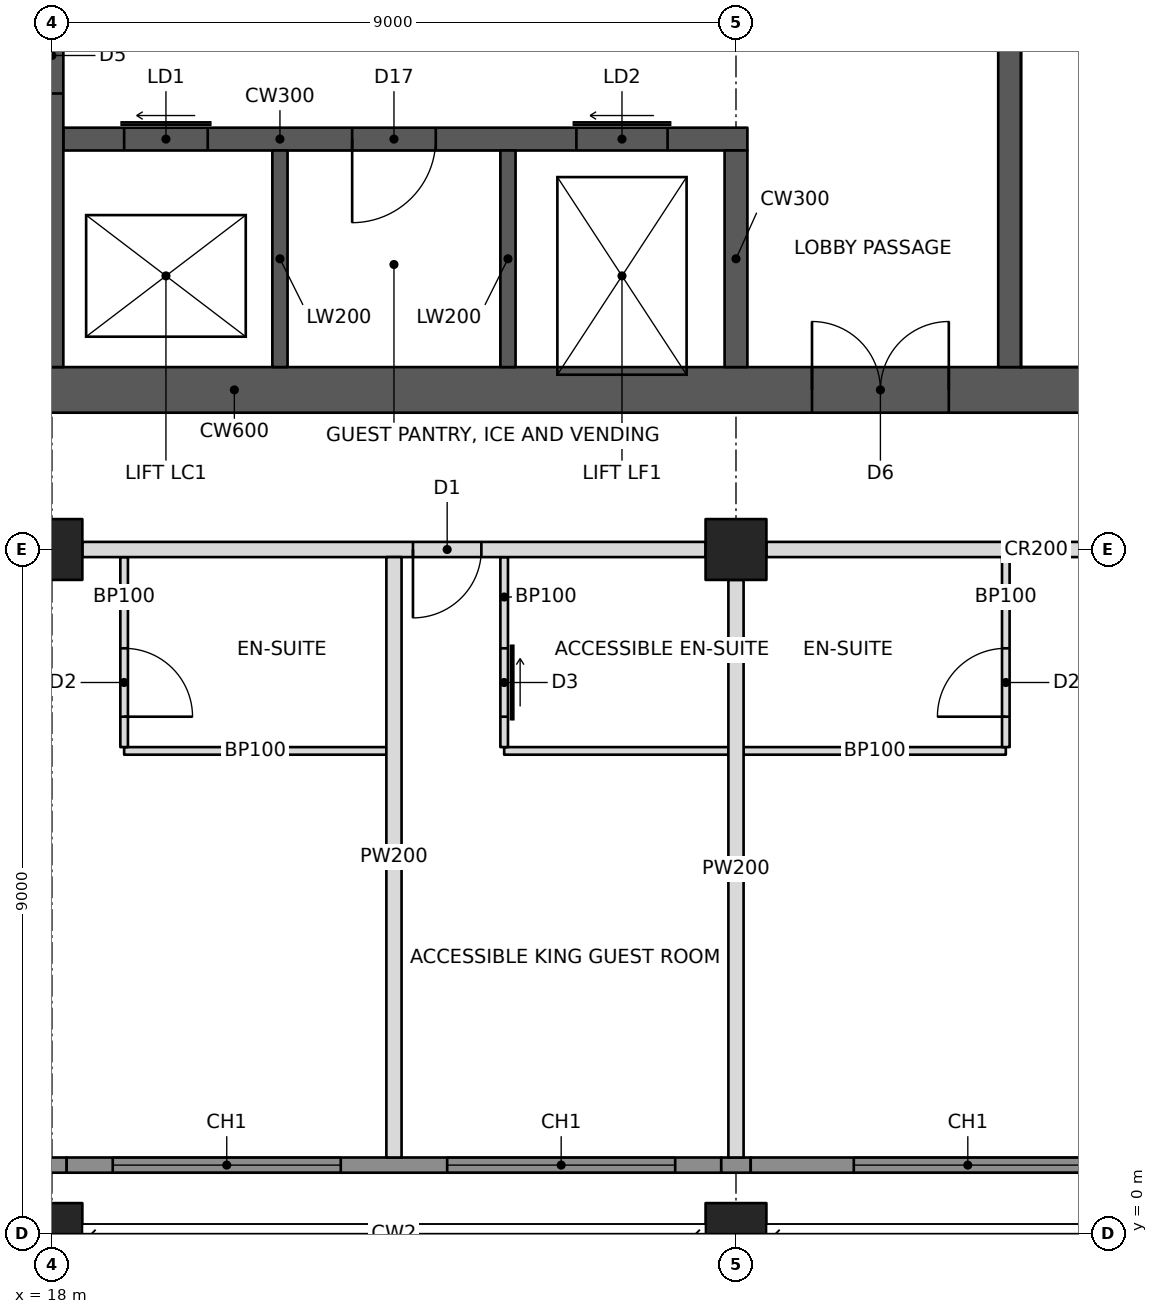
"""IFC4 building model, lengths in metres.
Left out: names, types, materials, properties, quantities, classifications, styles, units other than length and angle.
Written with IfcOpenShell. Run it as: python <this file> out.ifc"""

import sys

from ifc_helpers import new_model, si_unit, direction, frame, frame_2d, origin, origin_2d, place, context, subcontext, project, spatial, rectangle, hollow_rectangle, extrude, element, fill, save


model = new_model("IFC4")
c1 = context("Model", 3, precision=1e-05, world=origin(), true_north=direction((0.0, 1.0)))
c2 = subcontext(c1, "Body", "Model", "MODEL_VIEW")
j1 = project(units=[si_unit("LENGTHUNIT", "METRE"), si_unit("PLANEANGLEUNIT", "RADIAN")], contexts=[c1])
p1 = place(None, origin())
s1 = spatial("IfcSite", under=j1, at=p1, CompositionType="ELEMENT")
p2 = place(p1, origin())
s2 = spatial("IfcBuilding", under=s1, at=p2, CompositionType="ELEMENT")
p3 = place(p2, frame((0.0, 0.0, 237.4)))
s3 = spatial("IfcBuildingStorey", under=s2, at=p3, CompositionType="ELEMENT", Elevation=237.4)
p4 = place(p3, frame((18.0, 0.0, 0.0), z_axis=(0.0, 0.0, 1.0), x_axis=(1.0, 0.0, 0.0)))
e1 = element("IfcColumn", 1, at=p4, inside=s3, PredefinedType="COLUMN", context=c2, shape_type="SweptSolid", body=[
    extrude(hollow_rectangle(XDim=0.8, YDim=0.8, WallThickness=0.05, at=origin_2d()), origin(), (0.0, 0.0, 1.0), 3.6),
])
p5 = place(p3, frame((18.0, 9.0, 0.0), z_axis=(0.0, 0.0, 1.0), x_axis=(1.0, 0.0, 0.0)))
e2 = element("IfcColumn", 2, at=p5, inside=s3, PredefinedType="COLUMN", context=c2, shape_type="SweptSolid", body=[
    extrude(hollow_rectangle(XDim=0.8, YDim=0.8, WallThickness=0.04, at=origin_2d()), origin(), (0.0, 0.0, 1.0), 3.6),
])
p6 = place(p3, frame((27.0, 0.0, 0.0), z_axis=(0.0, 0.0, 1.0), x_axis=(1.0, 0.0, 0.0)))
e3 = element("IfcColumn", 3, at=p6, inside=s3, PredefinedType="COLUMN", context=c2, shape_type="SweptSolid", body=[
    extrude(hollow_rectangle(XDim=0.8, YDim=0.8, WallThickness=0.05, at=origin_2d()), origin(), (0.0, 0.0, 1.0), 3.6),
])
p7 = place(p3, frame((27.0, 9.0, 0.0), z_axis=(0.0, 0.0, 1.0), x_axis=(1.0, 0.0, 0.0)))
e4 = element("IfcColumn", 4, at=p7, inside=s3, PredefinedType="COLUMN", context=c2, shape_type="SweptSolid", body=[
    extrude(hollow_rectangle(XDim=0.8, YDim=0.8, WallThickness=0.04, at=origin_2d()), origin(), (0.0, 0.0, 1.0), 3.6),
])
p8 = place(p3, frame((10.8, 11.1, 0.0), z_axis=(0.0, 0.0, 1.0), x_axis=(1.0, 0.0, 0.0)))
e5 = element("IfcWall", 5, at=p8, inside=s3, PredefinedType="SHEAR", context=c2, shape_type="SweptSolid", body=[
    extrude(rectangle(XDim=23.4, YDim=0.6, at=frame_2d((11.7, 0.0))), origin(), (0.0, 0.0, 1.0), 3.6),
])
p9 = place(p8, frame((1.0, 0.0, 0.0)))
e6 = element("IfcOpeningElement", 6, at=p9, cuts=e5, PredefinedType="OPENING", context=c2, shape_type="SweptSolid", body=[
    extrude(rectangle(XDim=1.0, YDim=2.1, at=frame_2d((0.5, 1.05))), frame((0.0, 0.31, 0.0), z_axis=(0.0, -1.0, 0.0), x_axis=(1.0, 0.0, 0.0)), (0.0, 0.0, 1.0), 0.62),
])
p10 = place(p8, frame((17.2, 0.0, 0.0)))
e7 = element("IfcOpeningElement", 7, at=p10, cuts=e5, PredefinedType="OPENING", context=c2, shape_type="SweptSolid", body=[
    extrude(rectangle(XDim=1.8, YDim=2.1, at=frame_2d((0.9, 1.05))), frame((0.0, 0.31, 0.0), z_axis=(0.0, -1.0, 0.0), x_axis=(1.0, 0.0, 0.0)), (0.0, 0.0, 1.0), 0.62),
])
p11 = place(p3, frame((18.0, 11.4, 0.0), z_axis=(0.0, 0.0, 1.0), x_axis=(0.0, 1.0, 0.0)))
e8 = element("IfcWall", 8, at=p11, inside=s3, PredefinedType="SHEAR", context=c2, shape_type="SweptSolid", body=[
    extrude(rectangle(XDim=13.2, YDim=0.3, at=frame_2d((6.6, 0.0))), origin(), (0.0, 0.0, 1.0), 3.6),
])
p12 = place(p11, frame((3.6, 0.0, 0.0)))
e9 = element("IfcOpeningElement", 9, at=p12, cuts=e8, PredefinedType="OPENING", context=c2, shape_type="SweptSolid", body=[
    extrude(rectangle(XDim=1.0, YDim=2.1, at=frame_2d((0.5, 1.05))), frame((0.0, 0.16, 0.0), z_axis=(0.0, -1.0, 0.0), x_axis=(1.0, 0.0, 0.0)), (0.0, 0.0, 1.0), 0.32),
])
p13 = place(p11, frame((7.85, 0.0, 0.0)))
e10 = element("IfcOpeningElement", 10, at=p13, cuts=e8, PredefinedType="OPENING", context=c2, shape_type="SweptSolid", body=[
    extrude(rectangle(XDim=1.1, YDim=2.1, at=frame_2d((0.55, 1.05))), frame((0.0, 0.16, 0.0), z_axis=(0.0, -1.0, 0.0), x_axis=(1.0, 0.0, 0.0)), (0.0, 0.0, 1.0), 0.32),
])
p14 = place(p3, frame((18.15, 14.4, 0.0), z_axis=(0.0, 0.0, 1.0), x_axis=(1.0, 0.0, 0.0)))
e11 = element("IfcWall", 11, at=p14, inside=s3, PredefinedType="SHEAR", context=c2, shape_type="SweptSolid", body=[
    extrude(rectangle(XDim=9.0, YDim=0.3, at=frame_2d((4.5, 0.0))), origin(), (0.0, 0.0, 1.0), 3.6),
])
p15 = place(p14, frame((0.8, 0.0, 0.0)))
e12 = element("IfcOpeningElement", 12, at=p15, cuts=e11, PredefinedType="OPENING", context=c2, shape_type="SweptSolid", body=[
    extrude(rectangle(XDim=1.1, YDim=2.1, at=frame_2d((0.55, 1.05))), frame((0.0, 0.16, 0.0), z_axis=(0.0, -1.0, 0.0), x_axis=(1.0, 0.0, 0.0)), (0.0, 0.0, 1.0), 0.32),
])
p16 = place(p14, frame((6.75, 0.0, 0.0)))
e13 = element("IfcOpeningElement", 13, at=p16, cuts=e11, PredefinedType="OPENING", context=c2, shape_type="SweptSolid", body=[
    extrude(rectangle(XDim=1.2, YDim=2.1, at=frame_2d((0.6, 1.05))), frame((0.0, 0.16, 0.0), z_axis=(0.0, -1.0, 0.0), x_axis=(1.0, 0.0, 0.0)), (0.0, 0.0, 1.0), 0.32),
])
p17 = place(p14, frame((3.8, 0.0, 0.0)))
e14 = element("IfcOpeningElement", 14, at=p17, cuts=e11, PredefinedType="OPENING", context=c2, shape_type="SweptSolid", body=[
    extrude(rectangle(XDim=1.1, YDim=2.1, at=frame_2d((0.55, 1.05))), frame((0.0, 0.16, 0.0), z_axis=(0.0, -1.0, 0.0), x_axis=(1.0, 0.0, 0.0)), (0.0, 0.0, 1.0), 0.32),
])
p18 = place(p3, frame((27.0, 11.4, 0.0), z_axis=(0.0, 0.0, 1.0), x_axis=(0.0, 1.0, 0.0)))
e15 = element("IfcWall", 15, at=p18, inside=s3, PredefinedType="SHEAR", context=c2, shape_type="SweptSolid", body=[
    extrude(rectangle(XDim=2.85, YDim=0.3, at=frame_2d((1.425, 0.0))), origin(), (0.0, 0.0, 1.0), 3.6),
])
for number, where, z_axis, x_axis in (
    (16, (21.0, 11.4, 0.0), (0.0, 0.0, 1.0), (0.0, 1.0, 0.0)),
    (17, (24.0, 11.4, 0.0), (0.0, 0.0, 1.0), (0.0, 1.0, 0.0)),
):
    element("IfcWall", number, at=place(p3, frame(where, z_axis=z_axis, x_axis=x_axis)), inside=s3, PredefinedType="SHEAR", context=c2, shape_type="SweptSolid", body=[
        extrude(rectangle(XDim=2.85, YDim=0.2, at=frame_2d((1.425, 0.0))), origin(), (0.0, 0.0, 1.0), 3.6),
    ])
p19 = place(p3, frame((30.6, 11.4, 0.0), z_axis=(0.0, 0.0, 1.0), x_axis=(0.0, 1.0, 0.0)))
e18 = element("IfcWall", 18, at=p19, inside=s3, PredefinedType="SHEAR", context=c2, shape_type="SweptSolid", body=[
    extrude(rectangle(XDim=13.2, YDim=0.3, at=frame_2d((6.6, 0.0))), origin(), (0.0, 0.0, 1.0), 3.6),
])
p20 = place(p3, frame((18.4, 9.0, 0.0), z_axis=(0.0, 0.0, 1.0), x_axis=(1.0, 0.0, 0.0)))
e19 = element("IfcWall", 19, at=p20, inside=s3, PredefinedType="PARTITIONING", context=c2, shape_type="SweptSolid", body=[
    extrude(rectangle(XDim=8.2, YDim=0.2, at=frame_2d((4.1, 0.0))), origin(), (0.0, 0.0, 1.0), 2.605),
])
p21 = place(p20, frame((4.35, 0.0, 0.0)))
e20 = element("IfcOpeningElement", 20, at=p21, cuts=e19, PredefinedType="OPENING", context=c2, shape_type="SweptSolid", body=[
    extrude(rectangle(XDim=0.9, YDim=2.1, at=frame_2d((0.45, 1.05))), frame((0.0, 0.11, 0.0), z_axis=(0.0, -1.0, 0.0), x_axis=(1.0, 0.0, 0.0)), (0.0, 0.0, 1.0), 0.22),
])
p22 = place(p3, frame((27.4, 9.0, 0.0), z_axis=(0.0, 0.0, 1.0), x_axis=(1.0, 0.0, 0.0)))
e21 = element("IfcWall", 21, at=p22, inside=s3, PredefinedType="PARTITIONING", context=c2, shape_type="SweptSolid", body=[
    extrude(rectangle(XDim=8.368, YDim=0.2, at=frame_2d((4.184, 0.0))), origin(), (0.0, 0.0, 1.0), 2.605),
])
p23 = place(p22, frame((7.25, 0.0, 0.0)))
e22 = element("IfcOpeningElement", 22, at=p23, cuts=e21, PredefinedType="OPENING", context=c2, shape_type="SweptSolid", body=[
    extrude(rectangle(XDim=0.9, YDim=2.1, at=frame_2d((0.45, 1.05))), frame((0.0, 0.11, 0.0), z_axis=(0.0, -1.0, 0.0), x_axis=(1.0, 0.0, 0.0)), (0.0, 0.0, 1.0), 0.22),
])
p24 = place(p3, frame((22.5, 8.9, 0.0), z_axis=(0.0, 0.0, 1.0), x_axis=(0.0, -1.0, 0.0)))
e23 = element("IfcWall", 23, at=p24, inside=s3, PredefinedType="PARTITIONING", context=c2, shape_type="SweptSolid", body=[
    extrude(rectangle(XDim=7.9, YDim=0.2, at=frame_2d((3.95, 0.0))), origin(), (0.0, 0.0, 1.0), 2.604),
])
p25 = place(p3, frame((27.0, 8.6, 0.0), z_axis=(0.0, 0.0, 1.0), x_axis=(0.0, -1.0, 0.0)))
e24 = element("IfcWall", 24, at=p25, inside=s3, PredefinedType="PARTITIONING", context=c2, shape_type="SweptSolid", body=[
    extrude(rectangle(XDim=7.6, YDim=0.2, at=frame_2d((3.8, 0.0))), origin(), (0.0, 0.0, 1.0), 2.605),
])
p26 = place(p3, frame((18.95, 6.35, 0.0), z_axis=(0.0, 0.0, 1.0), x_axis=(1.0, 0.0, 0.0)))
e25 = element("IfcWall", 25, at=p26, inside=s3, PredefinedType="PARTITIONING", context=c2, shape_type="SweptSolid", body=[
    extrude(rectangle(XDim=3.45, YDim=0.1, at=frame_2d((1.725, 0.0))), origin(), (0.0, 0.0, 1.0), 3.4),
])
p27 = place(p3, frame((18.95, 8.9, 0.0), z_axis=(0.0, 0.0, 1.0), x_axis=(0.0, -1.0, 0.0)))
e26 = element("IfcWall", 26, at=p27, inside=s3, PredefinedType="PARTITIONING", context=c2, shape_type="SweptSolid", body=[
    extrude(rectangle(XDim=2.5, YDim=0.1, at=frame_2d((1.25, 0.0))), origin(), (0.0, 0.0, 1.0), 2.604),
])
p28 = place(p27, frame((1.2, 0.0, 0.0)))
e27 = element("IfcOpeningElement", 27, at=p28, cuts=e26, PredefinedType="OPENING", context=c2, shape_type="SweptSolid", body=[
    extrude(rectangle(XDim=0.9, YDim=2.1, at=frame_2d((0.45, 1.05))), frame((0.0, 0.06, 0.0), z_axis=(0.0, -1.0, 0.0), x_axis=(1.0, 0.0, 0.0)), (0.0, 0.0, 1.0), 0.12),
])
p29 = place(p3, frame((23.95, 6.35, 0.0), z_axis=(0.0, 0.0, 1.0), x_axis=(1.0, 0.0, 0.0)))
e28 = element("IfcWall", 28, at=p29, inside=s3, PredefinedType="PARTITIONING", context=c2, shape_type="SweptSolid", body=[
    extrude(rectangle(XDim=2.95, YDim=0.1, at=frame_2d((1.475, 0.0))), origin(), (0.0, 0.0, 1.0), 2.604),
])
p30 = place(p3, frame((23.95, 8.9, 0.0), z_axis=(0.0, 0.0, 1.0), x_axis=(0.0, -1.0, 0.0)))
e29 = element("IfcWall", 29, at=p30, inside=s3, PredefinedType="PARTITIONING", context=c2, shape_type="SweptSolid", body=[
    extrude(rectangle(XDim=2.5, YDim=0.1, at=frame_2d((1.25, 0.0))), origin(), (0.0, 0.0, 1.0), 2.604),
])
p31 = place(p30, frame((1.2, 0.0, 0.0)))
e30 = element("IfcOpeningElement", 30, at=p31, cuts=e29, PredefinedType="OPENING", context=c2, shape_type="SweptSolid", body=[
    extrude(rectangle(XDim=0.9, YDim=2.1, at=frame_2d((0.45, 1.05))), frame((0.0, 0.06, 0.0), z_axis=(0.0, -1.0, 0.0), x_axis=(1.0, 0.0, 0.0)), (0.0, 0.0, 1.0), 0.12),
])
p32 = place(p3, frame((27.1, 6.35, 0.0), z_axis=(0.0, 0.0, 1.0), x_axis=(1.0, 0.0, 0.0)))
e31 = element("IfcWall", 31, at=p32, inside=s3, PredefinedType="PARTITIONING", context=c2, shape_type="SweptSolid", body=[
    extrude(rectangle(XDim=3.45, YDim=0.1, at=frame_2d((1.725, 0.0))), origin(), (0.0, 0.0, 1.0), 2.604),
])
p33 = place(p3, frame((30.55, 8.9, 0.0), z_axis=(0.0, 0.0, 1.0), x_axis=(0.0, -1.0, 0.0)))
e32 = element("IfcWall", 32, at=p33, inside=s3, PredefinedType="PARTITIONING", context=c2, shape_type="SweptSolid", body=[
    extrude(rectangle(XDim=2.5, YDim=0.1, at=frame_2d((1.25, 0.0))), origin(), (0.0, 0.0, 1.0), 2.604),
])
p34 = place(p33, frame((1.2, 0.0, 0.0)))
e33 = element("IfcOpeningElement", 33, at=p34, cuts=e32, PredefinedType="OPENING", context=c2, shape_type="SweptSolid", body=[
    extrude(rectangle(XDim=0.9, YDim=2.1, at=frame_2d((0.45, 1.05))), frame((0.0, 0.06, 0.0), z_axis=(0.0, -1.0, 0.0), x_axis=(1.0, 0.0, 0.0)), (0.0, 0.0, 1.0), 0.12),
])
p35 = place(p3, frame((17.806, 0.9, 0.0), z_axis=(0.0, 0.0, 1.0), x_axis=(1.0, 0.0, 0.0)))
e34 = element("IfcWall", 34, at=p35, inside=s3, PredefinedType="SOLIDWALL", context=c2, shape_type="SweptSolid", body=[
    extrude(rectangle(XDim=0.388, YDim=0.2, at=frame_2d((0.194, 0.0))), origin(), (0.0, 0.0, 1.0), 2.604),
])
p36 = place(p3, frame((18.194, 0.9, 0.0), z_axis=(0.0, 0.0, 1.0), x_axis=(1.0, 0.0, 0.0)))
e35 = element("IfcWall", 35, at=p36, inside=s3, PredefinedType="SOLIDWALL", context=c2, shape_type="SweptSolid", body=[
    extrude(rectangle(XDim=8.612, YDim=0.2, at=frame_2d((4.306, 0.0))), origin(), (0.0, 0.0, 1.0), 3.4),
])
p37 = place(p36, frame((0.606, 0.0, 0.6)))
e36 = element("IfcOpeningElement", 36, at=p37, cuts=e35, PredefinedType="OPENING", context=c2, shape_type="SweptSolid", body=[
    extrude(rectangle(XDim=3.0, YDim=2.2, at=frame_2d((1.5, 1.1))), frame((0.0, 0.11, 0.0), z_axis=(0.0, -1.0, 0.0), x_axis=(1.0, 0.0, 0.0)), (0.0, 0.0, 1.0), 0.22),
])
p38 = place(p36, frame((5.006, 0.0, 0.6)))
e37 = element("IfcOpeningElement", 37, at=p38, cuts=e35, PredefinedType="OPENING", context=c2, shape_type="SweptSolid", body=[
    extrude(rectangle(XDim=3.0, YDim=2.2, at=frame_2d((1.5, 1.1))), frame((0.0, 0.11, 0.0), z_axis=(0.0, -1.0, 0.0), x_axis=(1.0, 0.0, 0.0)), (0.0, 0.0, 1.0), 0.22),
])
p39 = place(p3, frame((26.806, 0.9, 0.0), z_axis=(0.0, 0.0, 1.0), x_axis=(1.0, 0.0, 0.0)))
e38 = element("IfcWall", 38, at=p39, inside=s3, PredefinedType="SOLIDWALL", context=c2, shape_type="SweptSolid", body=[
    extrude(rectangle(XDim=0.388, YDim=0.2, at=frame_2d((0.194, 0.0))), origin(), (0.0, 0.0, 1.0), 2.604),
])
p40 = place(p3, frame((27.194, 0.9, 0.0), z_axis=(0.0, 0.0, 1.0), x_axis=(1.0, 0.0, 0.0)))
e39 = element("IfcWall", 39, at=p40, inside=s3, PredefinedType="SOLIDWALL", context=c2, shape_type="SweptSolid", body=[
    extrude(rectangle(XDim=5.806, YDim=0.2, at=frame_2d((2.903, 0.0))), origin(), (0.0, 0.0, 1.0), 3.4),
])
p41 = place(p40, frame((1.356, 0.0, 0.6)))
e40 = element("IfcOpeningElement", 40, at=p41, cuts=e39, PredefinedType="OPENING", context=c2, shape_type="SweptSolid", body=[
    extrude(rectangle(XDim=3.0, YDim=2.2, at=frame_2d((1.5, 1.1))), frame((0.0, 0.11, 0.0), z_axis=(0.0, -1.0, 0.0), x_axis=(1.0, 0.0, 0.0)), (0.0, 0.0, 1.0), 0.22),
])
p42 = place(p37, origin())
e41 = element("IfcWindow", 41, at=p42, inside=s3, PartitioningType="TRIPLE_PANEL_VERTICAL", PredefinedType="WINDOW", context=c2, shape_type="SweptSolid", body=[
    extrude(rectangle(XDim=3.0, YDim=2.2, at=frame_2d((1.5, 1.1))), frame((0.0, 0.03, 0.0), z_axis=(0.0, -1.0, 0.0), x_axis=(1.0, 0.0, 0.0)), (0.0, 0.0, 1.0), 0.06),
])
fill(e36, e41)
p43 = place(p38, origin())
e42 = element("IfcWindow", 42, at=p43, inside=s3, PartitioningType="TRIPLE_PANEL_VERTICAL", PredefinedType="WINDOW", context=c2, shape_type="SweptSolid", body=[
    extrude(rectangle(XDim=3.0, YDim=2.2, at=frame_2d((1.5, 1.1))), frame((0.0, 0.03, 0.0), z_axis=(0.0, -1.0, 0.0), x_axis=(1.0, 0.0, 0.0)), (0.0, 0.0, 1.0), 0.06),
])
fill(e37, e42)
p44 = place(p41, origin())
e43 = element("IfcWindow", 43, at=p44, inside=s3, PartitioningType="TRIPLE_PANEL_VERTICAL", PredefinedType="WINDOW", context=c2, shape_type="SweptSolid", body=[
    extrude(rectangle(XDim=3.0, YDim=2.2, at=frame_2d((1.5, 1.1))), frame((0.0, 0.03, 0.0), z_axis=(0.0, -1.0, 0.0), x_axis=(1.0, 0.0, 0.0)), (0.0, 0.0, 1.0), 0.06),
])
fill(e40, e43)
p45 = place(p28, origin())
e44 = element("IfcDoor", 44, at=p45, inside=s3, OperationType="SINGLE_SWING_RIGHT", PredefinedType="DOOR", context=c2, shape_type="SweptSolid", body=[
    extrude(rectangle(XDim=0.9, YDim=2.1, at=frame_2d((0.45, 1.05))), frame((0.0, 0.025, 0.0), z_axis=(0.0, -1.0, 0.0), x_axis=(1.0, 0.0, 0.0)), (0.0, 0.0, 1.0), 0.05),
])
fill(e27, e44)
p46 = place(p31, origin())
e45 = element("IfcDoor", 45, at=p46, inside=s3, OperationType="SLIDING_TO_LEFT", PredefinedType="DOOR", context=c2, shape_type="SweptSolid", body=[
    extrude(rectangle(XDim=0.9, YDim=2.1, at=frame_2d((0.45, 1.05))), frame((0.0, 0.025, 0.0), z_axis=(0.0, -1.0, 0.0), x_axis=(1.0, 0.0, 0.0)), (0.0, 0.0, 1.0), 0.05),
])
fill(e30, e45)
p47 = place(p21, frame((0.9, 0.0, 0.0), z_axis=(0.0, 0.0, 1.0), x_axis=(-1.0, 0.0, 0.0)))
e46 = element("IfcDoor", 46, at=p47, inside=s3, OperationType="SINGLE_SWING_RIGHT", PredefinedType="DOOR", context=c2, shape_type="SweptSolid", body=[
    extrude(rectangle(XDim=0.9, YDim=2.1, at=frame_2d((0.45, 1.05))), frame((0.0, 0.025, 0.0), z_axis=(0.0, -1.0, 0.0), x_axis=(1.0, 0.0, 0.0)), (0.0, 0.0, 1.0), 0.05),
])
fill(e20, e46)
p48 = place(p34, frame((0.9, 0.0, 0.0), z_axis=(0.0, 0.0, 1.0), x_axis=(-1.0, 0.0, 0.0)))
e47 = element("IfcDoor", 47, at=p48, inside=s3, OperationType="SINGLE_SWING_LEFT", PredefinedType="DOOR", context=c2, shape_type="SweptSolid", body=[
    extrude(rectangle(XDim=0.9, YDim=2.1, at=frame_2d((0.45, 1.05))), frame((0.0, 0.025, 0.0), z_axis=(0.0, -1.0, 0.0), x_axis=(1.0, 0.0, 0.0)), (0.0, 0.0, 1.0), 0.05),
])
fill(e33, e47)
p49 = place(p10, origin())
e48 = element("IfcDoor", 48, at=p49, inside=s3, OperationType="DOUBLE_DOOR_SINGLE_SWING", PredefinedType="DOOR", context=c2, shape_type="SweptSolid", body=[
    extrude(rectangle(XDim=1.8, YDim=2.1, at=frame_2d((0.9, 1.05))), frame((0.0, 0.025, 0.0), z_axis=(0.0, -1.0, 0.0), x_axis=(1.0, 0.0, 0.0)), (0.0, 0.0, 1.0), 0.05),
])
fill(e7, e48)
p50 = place(p12, origin())
e49 = element("IfcDoor", 49, at=p50, inside=s3, OperationType="SINGLE_SWING_LEFT", PredefinedType="DOOR", context=c2, shape_type="SweptSolid", body=[
    extrude(rectangle(XDim=1.0, YDim=2.1, at=frame_2d((0.5, 1.05))), frame((0.0, 0.025, 0.0), z_axis=(0.0, -1.0, 0.0), x_axis=(1.0, 0.0, 0.0)), (0.0, 0.0, 1.0), 0.05),
])
fill(e9, e49)
p51 = place(p15, origin())
e50 = element("IfcDoor", 50, at=p51, inside=s3, OperationType="SLIDING_TO_LEFT", PredefinedType="DOOR", context=c2, shape_type="SweptSolid", body=[
    extrude(rectangle(XDim=1.1, YDim=2.1, at=frame_2d((0.55, 1.05))), frame((0.0, 0.025, 0.0), z_axis=(0.0, -1.0, 0.0), x_axis=(1.0, 0.0, 0.0)), (0.0, 0.0, 1.0), 0.05),
])
fill(e12, e50)
p52 = place(p16, origin())
e51 = element("IfcDoor", 51, at=p52, inside=s3, OperationType="SLIDING_TO_LEFT", PredefinedType="DOOR", context=c2, shape_type="SweptSolid", body=[
    extrude(rectangle(XDim=1.2, YDim=2.1, at=frame_2d((0.6, 1.05))), frame((0.0, 0.025, 0.0), z_axis=(0.0, -1.0, 0.0), x_axis=(1.0, 0.0, 0.0)), (0.0, 0.0, 1.0), 0.05),
])
fill(e13, e51)
p53 = place(p17, frame((1.1, 0.0, 0.0), z_axis=(0.0, 0.0, 1.0), x_axis=(-1.0, 0.0, 0.0)))
e52 = element("IfcDoor", 52, at=p53, inside=s3, OperationType="SINGLE_SWING_RIGHT", PredefinedType="DOOR", context=c2, shape_type="SweptSolid", body=[
    extrude(rectangle(XDim=1.1, YDim=2.1, at=frame_2d((0.55, 1.05))), frame((0.0, 0.025, 0.0), z_axis=(0.0, -1.0, 0.0), x_axis=(1.0, 0.0, 0.0)), (0.0, 0.0, 1.0), 0.05),
])
fill(e14, e52)
save(model, sys.argv[1])
